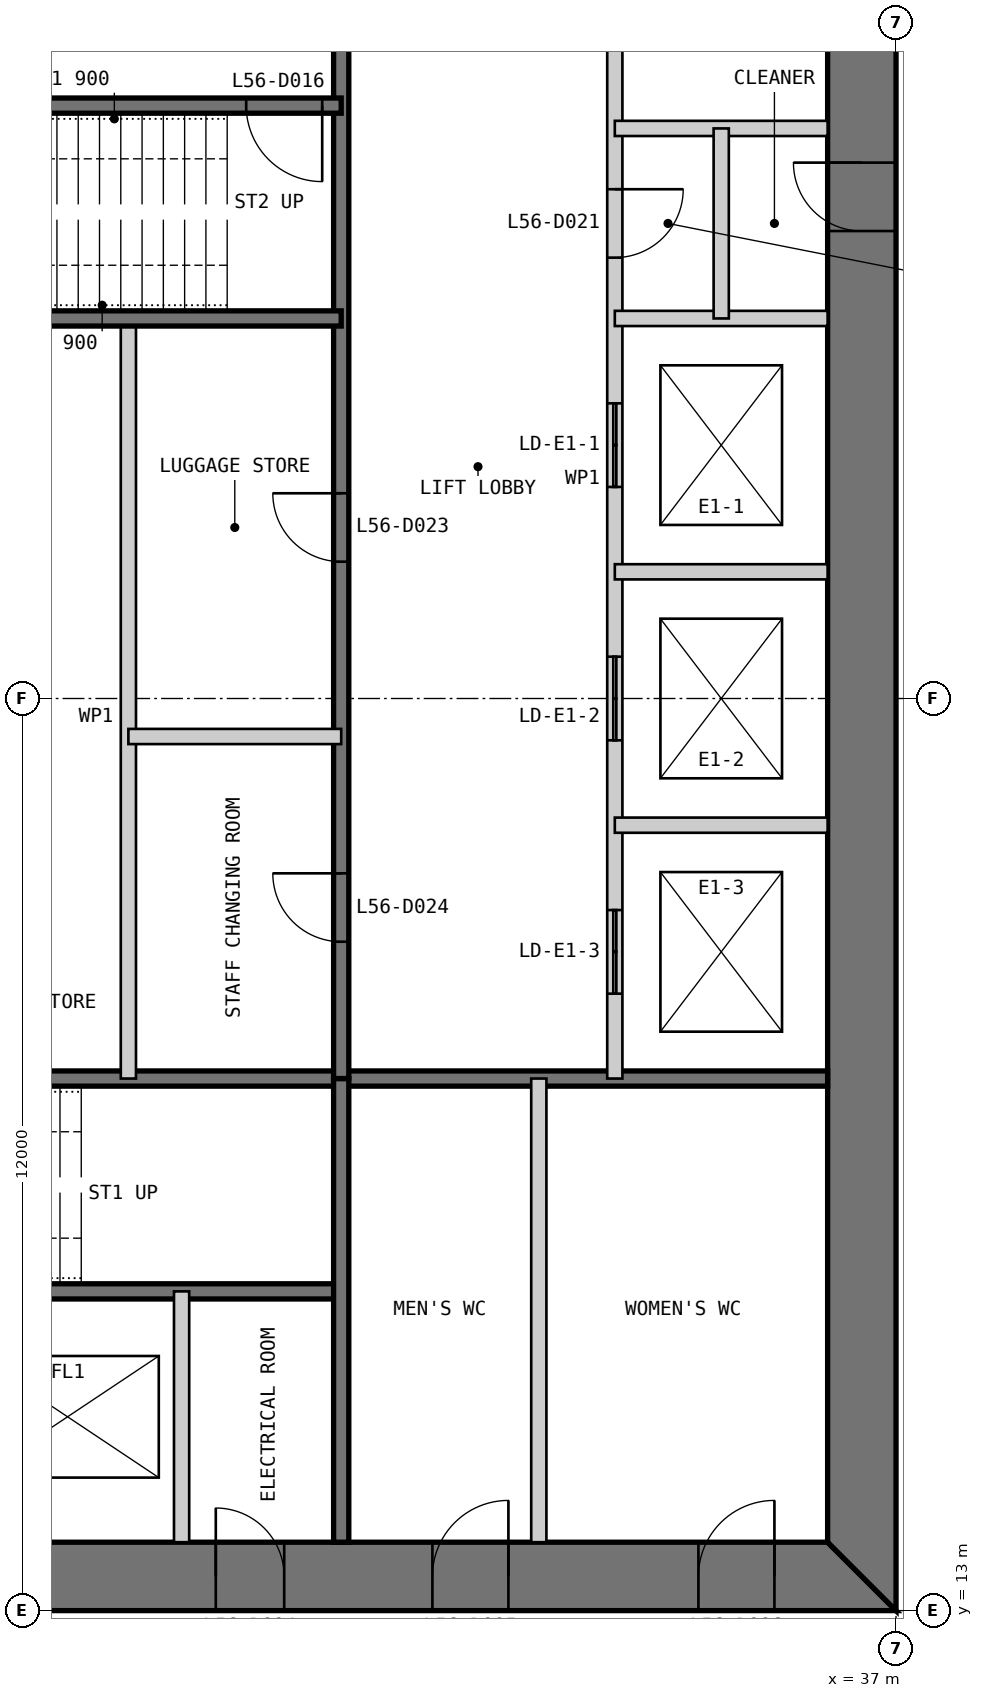
"""IFC4 building model, lengths in metres.
Left out: names, types, materials, properties, quantities, classifications, styles, units other than length and angle.
Written with IfcOpenShell. Run it as: python <this file> out.ifc"""

import sys

from ifc_helpers import new_model, si_unit, direction, frame, frame_2d, origin, place, context, subcontext, project, spatial, polyline, rectangle, outline, extrude, element, fill, save


model = new_model("IFC4")
c1 = context("Model", 3, precision=1e-05, world=origin(), true_north=direction((0.0, 1.0)))
c2 = subcontext(c1, "Body", "Model", "MODEL_VIEW")
j1 = project(units=[si_unit("LENGTHUNIT", "METRE"), si_unit("PLANEANGLEUNIT", "RADIAN")], contexts=[c1])
p1 = place(None, origin())
s1 = spatial("IfcSite", under=j1, at=p1, CompositionType="ELEMENT")
p2 = place(p1, origin())
s2 = spatial("IfcBuilding", under=s1, at=p2, CompositionType="ELEMENT")
p3 = place(p2, frame((0.0, 0.0, 239.8)))
s3 = spatial("IfcBuildingStorey", under=s2, at=p3, CompositionType="ELEMENT", Elevation=239.8)
p4 = place(p3, frame((13.0, 13.45, 0.0), z_axis=(0.0, 0.0, 1.0), x_axis=(1.0, 0.0, 0.0)))
e1 = element("IfcWall", 1, at=p4, inside=s3, PredefinedType="SHEAR", context=c2, shape_type="SweptSolid", body=[
    extrude(outline(polyline([(0.0, -0.45), (24.0, -0.45), (23.1, 0.45), (0.9, 0.45), (0.0, -0.45)])), origin(), (0.0, 0.0, 1.0), 6.0),
])
p5 = place(p4, frame((4.9, 0.0, 0.0)))
e2 = element("IfcOpeningElement", 2, at=p5, cuts=e1, PredefinedType="OPENING", context=c2, shape_type="SweptSolid", body=[
    extrude(rectangle(XDim=1.0, YDim=2.2, at=frame_2d((0.5, 1.1))), frame((0.0, 0.46, 0.0), z_axis=(0.0, -1.0, 0.0), x_axis=(1.0, 0.0, 0.0)), (0.0, 0.0, 1.0), 0.92),
])
p6 = place(p4, frame((8.9, 0.0, 0.0)))
e3 = element("IfcOpeningElement", 3, at=p6, cuts=e1, PredefinedType="OPENING", context=c2, shape_type="SweptSolid", body=[
    extrude(rectangle(XDim=1.1, YDim=2.2, at=frame_2d((0.55, 1.1))), frame((0.0, 0.46, 0.0), z_axis=(0.0, -1.0, 0.0), x_axis=(1.0, 0.0, 0.0)), (0.0, 0.0, 1.0), 0.92),
])
p7 = place(p4, frame((15.05, 0.0, 0.0)))
e4 = element("IfcOpeningElement", 4, at=p7, cuts=e1, PredefinedType="OPENING", context=c2, shape_type="SweptSolid", body=[
    extrude(rectangle(XDim=0.9, YDim=2.2, at=frame_2d((0.45, 1.1))), frame((0.0, 0.46, 0.0), z_axis=(0.0, -1.0, 0.0), x_axis=(1.0, 0.0, 0.0)), (0.0, 0.0, 1.0), 0.92),
])
p8 = place(p4, frame((17.9, 0.0, 0.0)))
e5 = element("IfcOpeningElement", 5, at=p8, cuts=e1, PredefinedType="OPENING", context=c2, shape_type="SweptSolid", body=[
    extrude(rectangle(XDim=1.0, YDim=2.2, at=frame_2d((0.5, 1.1))), frame((0.0, 0.46, 0.0), z_axis=(0.0, -1.0, 0.0), x_axis=(1.0, 0.0, 0.0)), (0.0, 0.0, 1.0), 0.92),
])
p9 = place(p4, frame((21.4, 0.0, 0.0)))
e6 = element("IfcOpeningElement", 6, at=p9, cuts=e1, PredefinedType="OPENING", context=c2, shape_type="SweptSolid", body=[
    extrude(rectangle(XDim=1.0, YDim=2.2, at=frame_2d((0.5, 1.1))), frame((0.0, 0.46, 0.0), z_axis=(0.0, -1.0, 0.0), x_axis=(1.0, 0.0, 0.0)), (0.0, 0.0, 1.0), 0.92),
])
p10 = place(p3, frame((36.55, 13.9, 0.0), z_axis=(0.0, 0.0, 1.0), x_axis=(0.0, 1.0, 0.0)))
e7 = element("IfcWall", 7, at=p10, inside=s3, PredefinedType="SHEAR", context=c2, shape_type="SweptSolid", body=[
    extrude(outline(polyline([(-0.9, -0.45), (23.1, -0.45), (22.2, 0.45), (0.0, 0.45), (-0.9, -0.45)])), origin(), (0.0, 0.0, 1.0), 6.0),
])
p11 = place(p10, frame((20.2, 0.0, 0.0)))
e8 = element("IfcOpeningElement", 8, at=p11, cuts=e7, PredefinedType="OPENING", context=c2, shape_type="SweptSolid", body=[
    extrude(rectangle(XDim=1.0, YDim=2.2, at=frame_2d((0.5, 1.1))), frame((0.0, 0.46, 0.0), z_axis=(0.0, -1.0, 0.0), x_axis=(1.0, 0.0, 0.0)), (0.0, 0.0, 1.0), 0.92),
])
p12 = place(p10, frame((17.25, 0.0, 0.0)))
e9 = element("IfcOpeningElement", 9, at=p12, cuts=e7, PredefinedType="OPENING", context=c2, shape_type="SweptSolid", body=[
    extrude(rectangle(XDim=0.9, YDim=2.2, at=frame_2d((0.45, 1.1))), frame((0.0, 0.46, 0.0), z_axis=(0.0, -1.0, 0.0), x_axis=(1.0, 0.0, 0.0)), (0.0, 0.0, 1.0), 0.92),
])
p13 = place(p3, frame((20.3, 17.2, 0.0), z_axis=(0.0, 0.0, 1.0), x_axis=(1.0, 0.0, 0.0)))
e10 = element("IfcWall", 10, at=p13, inside=s3, PredefinedType="SOLIDWALL", context=c2, shape_type="SweptSolid", body=[
    extrude(rectangle(XDim=9.4, YDim=0.2, at=frame_2d((4.7, 0.0))), origin(), (0.0, 0.0, 1.0), 5.8),
])
p14 = place(p13, frame((0.25, 0.0, 0.0)))
e11 = element("IfcOpeningElement", 11, at=p14, cuts=e10, PredefinedType="OPENING", context=c2, shape_type="SweptSolid", body=[
    extrude(rectangle(XDim=1.0, YDim=2.2, at=frame_2d((0.5, 1.1))), frame((0.0, 0.11, 0.0), z_axis=(0.0, -1.0, 0.0), x_axis=(1.0, 0.0, 0.0)), (0.0, 0.0, 1.0), 0.22),
])
p15 = place(p3, frame((20.3, 20.0, 0.0), z_axis=(0.0, 0.0, 1.0), x_axis=(1.0, 0.0, 0.0)))
e12 = element("IfcWall", 12, at=p15, inside=s3, PredefinedType="SOLIDWALL", context=c2, shape_type="SweptSolid", body=[
    extrude(rectangle(XDim=15.8, YDim=0.2, at=frame_2d((7.9, 0.0))), origin(), (0.0, 0.0, 1.0), 5.8),
])
p16 = place(p3, frame((27.6, 13.9, 0.0), z_axis=(0.0, 0.0, 1.0), x_axis=(0.0, 1.0, 0.0)))
e13 = element("IfcWall", 13, at=p16, inside=s3, PredefinedType="PARTITIONING", context=c2, shape_type="SweptSolid", body=[
    extrude(rectangle(XDim=3.3, YDim=0.2, at=frame_2d((1.65, 0.0))), origin(), (0.0, 0.0, 1.0), 5.8),
])
p17 = place(p3, frame((29.7, 13.9, 0.0), z_axis=(0.0, 0.0, 1.0), x_axis=(0.0, 1.0, 0.0)))
e14 = element("IfcWall", 14, at=p17, inside=s3, PredefinedType="SOLIDWALL", context=c2, shape_type="SweptSolid", body=[
    extrude(rectangle(XDim=6.1, YDim=0.2, at=frame_2d((3.05, 0.0))), origin(), (0.0, 0.0, 1.0), 5.8),
])
p18 = place(p3, frame((32.3, 13.9, 0.0), z_axis=(0.0, 0.0, 1.0), x_axis=(0.0, 1.0, 0.0)))
e15 = element("IfcWall", 15, at=p18, inside=s3, PredefinedType="PARTITIONING", context=c2, shape_type="SweptSolid", body=[
    extrude(rectangle(XDim=6.1, YDim=0.2, at=frame_2d((3.05, 0.0))), origin(), (0.0, 0.0, 1.0), 5.8),
])
p19 = place(p3, frame((33.3, 36.1, 0.0), z_axis=(0.0, 0.0, 1.0), x_axis=(0.0, -1.0, 0.0)))
e16 = element("IfcWall", 16, at=p19, inside=s3, PredefinedType="PARTITIONING", context=c2, shape_type="SweptSolid", body=[
    extrude(rectangle(XDim=16.1, YDim=0.2, at=frame_2d((8.05, 0.0))), origin(), (0.0, 0.0, 1.0), 5.8),
])
p20 = place(p19, frame((4.4, 0.0, 0.0)))
e17 = element("IfcOpeningElement", 17, at=p20, cuts=e16, PredefinedType="OPENING", context=c2, shape_type="SweptSolid", body=[
    extrude(rectangle(XDim=0.9, YDim=2.2, at=frame_2d((0.45, 1.1))), frame((0.0, 0.11, 0.0), z_axis=(0.0, -1.0, 0.0), x_axis=(1.0, 0.0, 0.0)), (0.0, 0.0, 1.0), 0.22),
])
p21 = place(p19, frame((7.217, 0.0, 0.0)))
e18 = element("IfcOpeningElement", 18, at=p21, cuts=e16, PredefinedType="OPENING", context=c2, shape_type="SweptSolid", body=[
    extrude(rectangle(XDim=1.1, YDim=2.2, at=frame_2d((0.55, 1.1))), frame((0.0, 0.11, 0.0), z_axis=(0.0, -1.0, 0.0), x_axis=(1.0, 0.0, 0.0)), (0.0, 0.0, 1.0), 0.22),
])
p22 = place(p19, frame((10.55, 0.0, 0.0)))
e19 = element("IfcOpeningElement", 19, at=p22, cuts=e16, PredefinedType="OPENING", context=c2, shape_type="SweptSolid", body=[
    extrude(rectangle(XDim=1.1, YDim=2.2, at=frame_2d((0.55, 1.1))), frame((0.0, 0.11, 0.0), z_axis=(0.0, -1.0, 0.0), x_axis=(1.0, 0.0, 0.0)), (0.0, 0.0, 1.0), 0.22),
])
p23 = place(p19, frame((13.883, 0.0, 0.0)))
e20 = element("IfcOpeningElement", 20, at=p23, cuts=e16, PredefinedType="OPENING", context=c2, shape_type="SweptSolid", body=[
    extrude(rectangle(XDim=1.1, YDim=2.2, at=frame_2d((0.55, 1.1))), frame((0.0, 0.11, 0.0), z_axis=(0.0, -1.0, 0.0), x_axis=(1.0, 0.0, 0.0)), (0.0, 0.0, 1.0), 0.22),
])
p24 = place(p3, frame((29.7, 36.1, 0.0), z_axis=(0.0, 0.0, 1.0), x_axis=(0.0, -1.0, 0.0)))
e21 = element("IfcWall", 21, at=p24, inside=s3, PredefinedType="SOLIDWALL", context=c2, shape_type="SweptSolid", body=[
    extrude(rectangle(XDim=16.1, YDim=0.2, at=frame_2d((8.05, 0.0))), origin(), (0.0, 0.0, 1.0), 5.8),
])
p25 = place(p24, frame((8.4, 0.0, 0.0)))
e22 = element("IfcOpeningElement", 22, at=p25, cuts=e21, PredefinedType="OPENING", context=c2, shape_type="SweptSolid", body=[
    extrude(rectangle(XDim=0.9, YDim=2.2, at=frame_2d((0.45, 1.1))), frame((0.0, 0.11, 0.0), z_axis=(0.0, -1.0, 0.0), x_axis=(1.0, 0.0, 0.0)), (0.0, 0.0, 1.0), 0.22),
])
p26 = place(p24, frame((13.4, 0.0, 0.0)))
e23 = element("IfcOpeningElement", 23, at=p26, cuts=e21, PredefinedType="OPENING", context=c2, shape_type="SweptSolid", body=[
    extrude(rectangle(XDim=0.9, YDim=2.2, at=frame_2d((0.45, 1.1))), frame((0.0, 0.11, 0.0), z_axis=(0.0, -1.0, 0.0), x_axis=(1.0, 0.0, 0.0)), (0.0, 0.0, 1.0), 0.22),
])
for number, where, z_axis, x_axis in (
    (24, (36.1, 30.0, 0.0), (0.0, 0.0, 1.0), (-1.0, 0.0, 0.0)),
    (25, (36.1, 26.667, 0.0), (0.0, 0.0, 1.0), (-1.0, 0.0, 0.0)),
    (26, (36.1, 23.333, 0.0), (0.0, 0.0, 1.0), (-1.0, 0.0, 0.0)),
):
    element("IfcWall", number, at=place(p3, frame(where, z_axis=z_axis, x_axis=x_axis)), inside=s3, PredefinedType="PARTITIONING", context=c2, shape_type="SweptSolid", body=[
        extrude(rectangle(XDim=2.8, YDim=0.2, at=frame_2d((1.4, 0.0))), origin(), (0.0, 0.0, 1.0), 5.8),
    ])
p27 = place(p3, frame((26.9, 30.0, 0.0), z_axis=(0.0, 0.0, 1.0), x_axis=(0.0, -1.0, 0.0)))
e27 = element("IfcWall", 27, at=p27, inside=s3, PredefinedType="PARTITIONING", context=c2, shape_type="SweptSolid", body=[
    extrude(rectangle(XDim=10.0, YDim=0.2, at=frame_2d((5.0, 0.0))), origin(), (0.0, 0.0, 1.0), 5.8),
])
p28 = place(p3, frame((29.7, 32.8, 0.0), z_axis=(0.0, 0.0, 1.0), x_axis=(-1.0, 0.0, 0.0)))
e28 = element("IfcWall", 28, at=p28, inside=s3, PredefinedType="SOLIDWALL", context=c2, shape_type="SweptSolid", body=[
    extrude(rectangle(XDim=9.4, YDim=0.2, at=frame_2d((4.7, 0.0))), origin(), (0.0, 0.0, 1.0), 5.8),
])
p29 = place(p28, frame((0.25, 0.0, 0.0)))
e29 = element("IfcOpeningElement", 29, at=p29, cuts=e28, PredefinedType="OPENING", context=c2, shape_type="SweptSolid", body=[
    extrude(rectangle(XDim=1.0, YDim=2.2, at=frame_2d((0.5, 1.1))), frame((0.0, 0.11, 0.0), z_axis=(0.0, -1.0, 0.0), x_axis=(1.0, 0.0, 0.0)), (0.0, 0.0, 1.0), 0.22),
])
p30 = place(p3, frame((29.7, 30.0, 0.0), z_axis=(0.0, 0.0, 1.0), x_axis=(-1.0, 0.0, 0.0)))
e30 = element("IfcWall", 30, at=p30, inside=s3, PredefinedType="SOLIDWALL", context=c2, shape_type="SweptSolid", body=[
    extrude(rectangle(XDim=15.8, YDim=0.2, at=frame_2d((7.9, 0.0))), origin(), (0.0, 0.0, 1.0), 5.8),
])
p31 = place(p3, frame((36.1, 32.5, 0.0), z_axis=(0.0, 0.0, 1.0), x_axis=(-1.0, 0.0, 0.0)))
e31 = element("IfcWall", 31, at=p31, inside=s3, PredefinedType="PARTITIONING", context=c2, shape_type="SweptSolid", body=[
    extrude(rectangle(XDim=2.8, YDim=0.2, at=frame_2d((1.4, 0.0))), origin(), (0.0, 0.0, 1.0), 5.8),
])
p32 = place(p3, frame((34.7, 32.5, 0.0), z_axis=(0.0, 0.0, 1.0), x_axis=(0.0, -1.0, 0.0)))
e32 = element("IfcWall", 32, at=p32, inside=s3, PredefinedType="PARTITIONING", context=c2, shape_type="SweptSolid", body=[
    extrude(rectangle(XDim=2.5, YDim=0.2, at=frame_2d((1.25, 0.0))), origin(), (0.0, 0.0, 1.0), 5.8),
])
p33 = place(p3, frame((29.7, 24.5, 0.0), z_axis=(0.0, 0.0, 1.0), x_axis=(-1.0, 0.0, 0.0)))
e33 = element("IfcWall", 33, at=p33, inside=s3, PredefinedType="PARTITIONING", context=c2, shape_type="SweptSolid", body=[
    extrude(rectangle(XDim=2.8, YDim=0.2, at=frame_2d((1.4, 0.0))), origin(), (0.0, 0.0, 1.0), 5.8),
])
p34 = place(p7, origin())
e34 = element("IfcDoor", 34, at=p34, inside=s3, OperationType="SINGLE_SWING_LEFT", PredefinedType="DOOR", context=c2, shape_type="SweptSolid", body=[
    extrude(rectangle(XDim=0.9, YDim=2.2, at=frame_2d((0.45, 1.1))), frame((0.0, 0.025, 0.0), z_axis=(0.0, -1.0, 0.0), x_axis=(1.0, 0.0, 0.0)), (0.0, 0.0, 1.0), 0.05),
    extrude(outline(polyline([(0.0, 0.0), (0.04, 0.0), (0.04, 2.16), (0.86, 2.16), (0.86, 0.0), (0.9, 0.0), (0.9, 2.2), (0.0, 2.2), (0.0, 0.0)])), frame((0.0, 0.3, 0.0), z_axis=(0.0, -1.0, 0.0), x_axis=(1.0, 0.0, 0.0)), (0.0, 0.0, 1.0), 0.6),
])
fill(e4, e34)
p35 = place(p8, origin())
e35 = element("IfcDoor", 35, at=p35, inside=s3, OperationType="SINGLE_SWING_RIGHT", PredefinedType="DOOR", context=c2, shape_type="SweptSolid", body=[
    extrude(rectangle(XDim=1.0, YDim=2.2, at=frame_2d((0.5, 1.1))), frame((0.0, 0.025, 0.0), z_axis=(0.0, -1.0, 0.0), x_axis=(1.0, 0.0, 0.0)), (0.0, 0.0, 1.0), 0.05),
    extrude(outline(polyline([(0.0, 0.0), (0.04, 0.0), (0.04, 2.16), (0.96, 2.16), (0.96, 0.0), (1.0, 0.0), (1.0, 2.2), (0.0, 2.2), (0.0, 0.0)])), frame((0.0, 0.3, 0.0), z_axis=(0.0, -1.0, 0.0), x_axis=(1.0, 0.0, 0.0)), (0.0, 0.0, 1.0), 0.6),
])
fill(e5, e35)
p36 = place(p9, origin())
e36 = element("IfcDoor", 36, at=p36, inside=s3, OperationType="SINGLE_SWING_RIGHT", PredefinedType="DOOR", context=c2, shape_type="SweptSolid", body=[
    extrude(rectangle(XDim=1.0, YDim=2.2, at=frame_2d((0.5, 1.1))), frame((0.0, 0.025, 0.0), z_axis=(0.0, -1.0, 0.0), x_axis=(1.0, 0.0, 0.0)), (0.0, 0.0, 1.0), 0.05),
    extrude(outline(polyline([(0.0, 0.0), (0.04, 0.0), (0.04, 2.16), (0.96, 2.16), (0.96, 0.0), (1.0, 0.0), (1.0, 2.2), (0.0, 2.2), (0.0, 0.0)])), frame((0.0, 0.3, 0.0), z_axis=(0.0, -1.0, 0.0), x_axis=(1.0, 0.0, 0.0)), (0.0, 0.0, 1.0), 0.6),
])
fill(e6, e36)
p37 = place(p29, origin())
e37 = element("IfcDoor", 37, at=p37, inside=s3, OperationType="SINGLE_SWING_LEFT", PredefinedType="DOOR", context=c2, shape_type="SweptSolid", body=[
    extrude(rectangle(XDim=1.0, YDim=2.2, at=frame_2d((0.5, 1.1))), frame((0.0, 0.025, 0.0), z_axis=(0.0, -1.0, 0.0), x_axis=(1.0, 0.0, 0.0)), (0.0, 0.0, 1.0), 0.05),
])
fill(e29, e37)
p38 = place(p20, origin())
e38 = element("IfcDoor", 38, at=p38, inside=s3, OperationType="SINGLE_SWING_LEFT", PredefinedType="DOOR", context=c2, shape_type="SweptSolid", body=[
    extrude(rectangle(XDim=0.9, YDim=2.2, at=frame_2d((0.45, 1.1))), frame((0.0, 0.025, 0.0), z_axis=(0.0, -1.0, 0.0), x_axis=(1.0, 0.0, 0.0)), (0.0, 0.0, 1.0), 0.05),
])
fill(e17, e38)
p39 = place(p12, origin())
e39 = element("IfcDoor", 39, at=p39, inside=s3, OperationType="SINGLE_SWING_RIGHT", PredefinedType="DOOR", context=c2, shape_type="SweptSolid", body=[
    extrude(rectangle(XDim=0.9, YDim=2.2, at=frame_2d((0.45, 1.1))), frame((0.0, 0.025, 0.0), z_axis=(0.0, -1.0, 0.0), x_axis=(1.0, 0.0, 0.0)), (0.0, 0.0, 1.0), 0.05),
    extrude(outline(polyline([(0.0, 0.0), (0.04, 0.0), (0.04, 2.16), (0.86, 2.16), (0.86, 0.0), (0.9, 0.0), (0.9, 2.2), (0.0, 2.2), (0.0, 0.0)])), frame((0.0, 0.3, 0.0), z_axis=(0.0, -1.0, 0.0), x_axis=(1.0, 0.0, 0.0)), (0.0, 0.0, 1.0), 0.6),
])
fill(e9, e39)
p40 = place(p25, frame((0.9, 0.0, 0.0), z_axis=(0.0, 0.0, 1.0), x_axis=(-1.0, 0.0, 0.0)))
e40 = element("IfcDoor", 40, at=p40, inside=s3, OperationType="SINGLE_SWING_RIGHT", PredefinedType="DOOR", context=c2, shape_type="SweptSolid", body=[
    extrude(rectangle(XDim=0.9, YDim=2.2, at=frame_2d((0.45, 1.1))), frame((0.0, 0.025, 0.0), z_axis=(0.0, -1.0, 0.0), x_axis=(1.0, 0.0, 0.0)), (0.0, 0.0, 1.0), 0.05),
])
fill(e22, e40)
p41 = place(p26, frame((0.9, 0.0, 0.0), z_axis=(0.0, 0.0, 1.0), x_axis=(-1.0, 0.0, 0.0)))
e41 = element("IfcDoor", 41, at=p41, inside=s3, OperationType="SINGLE_SWING_RIGHT", PredefinedType="DOOR", context=c2, shape_type="SweptSolid", body=[
    extrude(rectangle(XDim=0.9, YDim=2.2, at=frame_2d((0.45, 1.1))), frame((0.0, 0.025, 0.0), z_axis=(0.0, -1.0, 0.0), x_axis=(1.0, 0.0, 0.0)), (0.0, 0.0, 1.0), 0.05),
])
fill(e23, e41)
p42 = place(p21, origin())
e42 = element("IfcDoor", 42, at=p42, inside=s3, OperationType="DOUBLE_DOOR_SLIDING", PredefinedType="DOOR", context=c2, shape_type="SweptSolid", body=[
    extrude(rectangle(XDim=1.1, YDim=2.2, at=frame_2d((0.55, 1.1))), frame((0.0, 0.025, 0.0), z_axis=(0.0, -1.0, 0.0), x_axis=(1.0, 0.0, 0.0)), (0.0, 0.0, 1.0), 0.05),
])
fill(e18, e42)
p43 = place(p22, origin())
e43 = element("IfcDoor", 43, at=p43, inside=s3, OperationType="DOUBLE_DOOR_SLIDING", PredefinedType="DOOR", context=c2, shape_type="SweptSolid", body=[
    extrude(rectangle(XDim=1.1, YDim=2.2, at=frame_2d((0.55, 1.1))), frame((0.0, 0.025, 0.0), z_axis=(0.0, -1.0, 0.0), x_axis=(1.0, 0.0, 0.0)), (0.0, 0.0, 1.0), 0.05),
])
fill(e19, e43)
p44 = place(p23, origin())
e44 = element("IfcDoor", 44, at=p44, inside=s3, OperationType="DOUBLE_DOOR_SLIDING", PredefinedType="DOOR", context=c2, shape_type="SweptSolid", body=[
    extrude(rectangle(XDim=1.1, YDim=2.2, at=frame_2d((0.55, 1.1))), frame((0.0, 0.025, 0.0), z_axis=(0.0, -1.0, 0.0), x_axis=(1.0, 0.0, 0.0)), (0.0, 0.0, 1.0), 0.05),
])
fill(e20, e44)
save(model, sys.argv[1])
